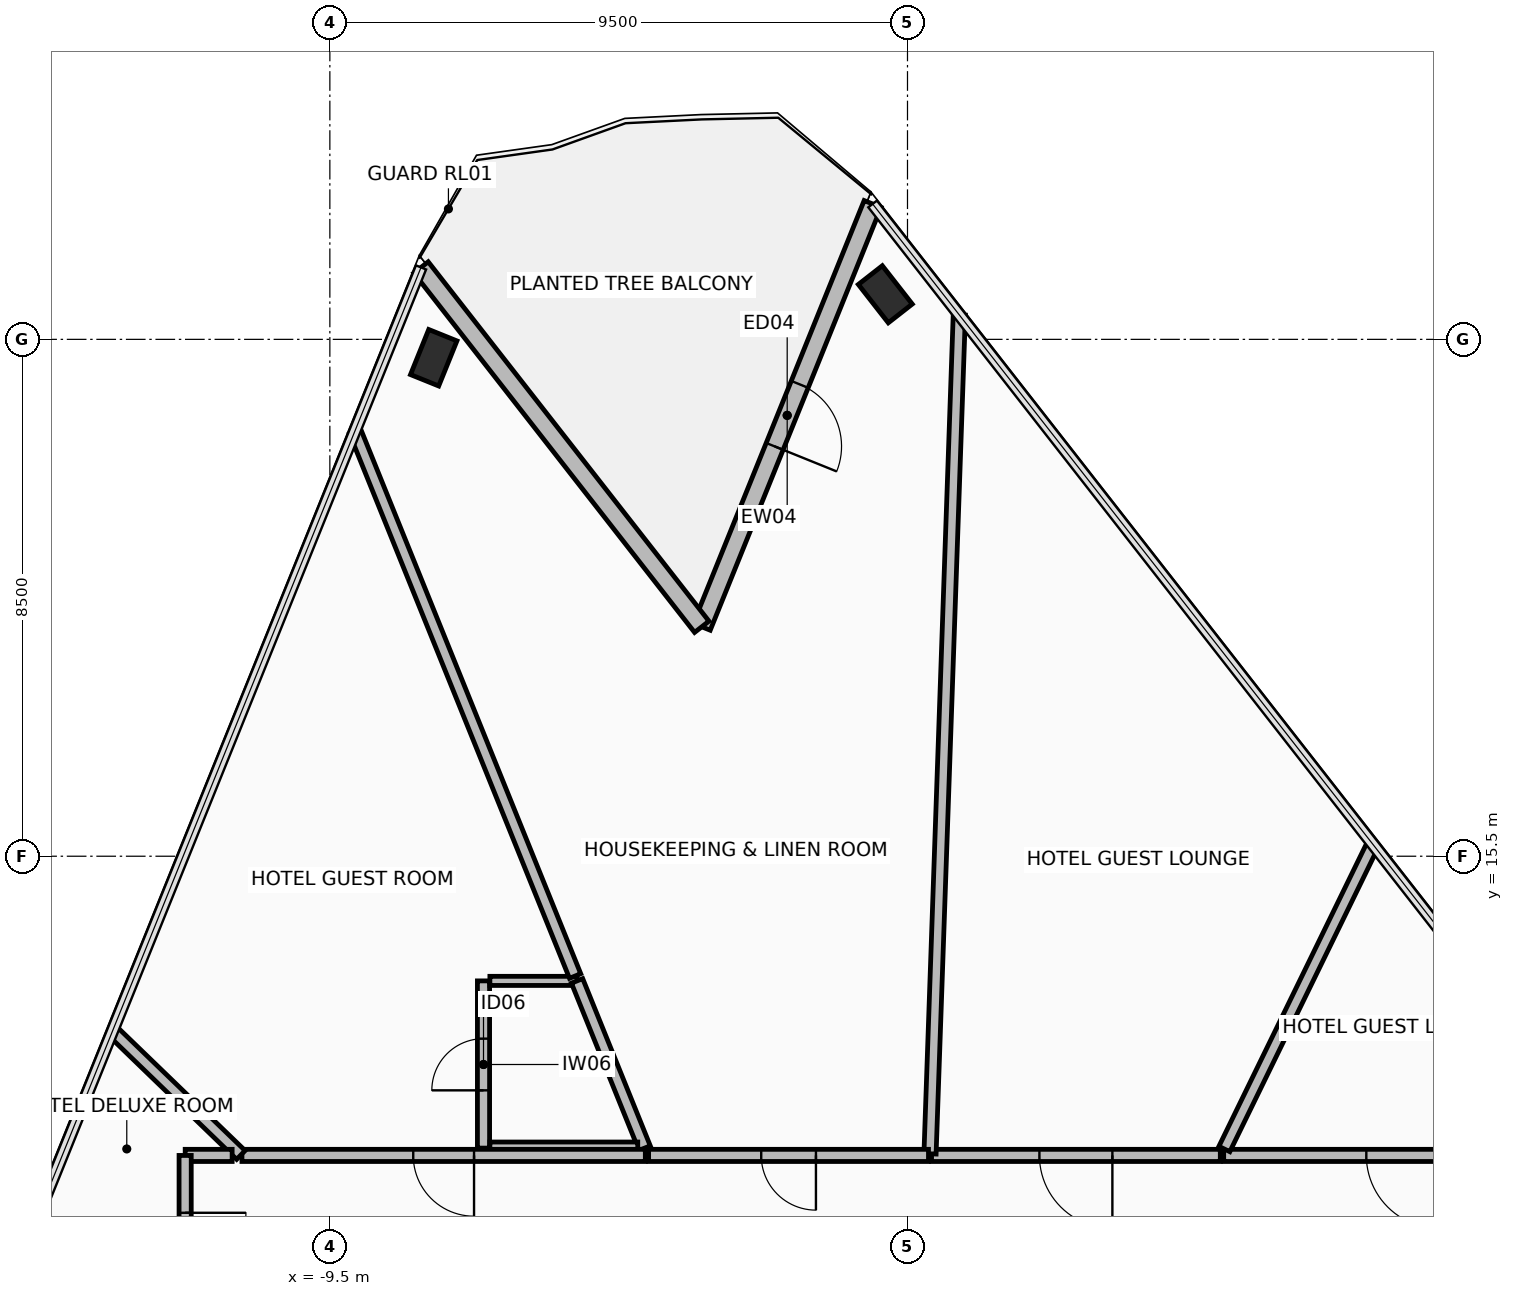
"""IFC4 building model, lengths in metres.
Left out: names, types, materials, properties, quantities, classifications, styles, units other than length and angle.
Written with IfcOpenShell. Run it as: python <this file> out.ifc"""

import sys

from ifc_helpers import new_model, si_unit, direction, frame, frame_2d, origin, origin_2d, place, context, subcontext, project, spatial, rectangle, hollow_rectangle, extrude, element, fill, save


model = new_model("IFC4")
c1 = context("Model", 3, precision=1e-05, world=origin(), true_north=direction((0.0, 1.0)))
c2 = subcontext(c1, "Body", "Model", "MODEL_VIEW")
j1 = project(units=[si_unit("LENGTHUNIT", "METRE"), si_unit("PLANEANGLEUNIT", "RADIAN")], contexts=[c1])
p1 = place(None, origin())
s1 = spatial("IfcSite", under=j1, at=p1, CompositionType="ELEMENT")
p2 = place(p1, origin())
s2 = spatial("IfcBuilding", under=s1, at=p2, CompositionType="ELEMENT")
p3 = place(p2, frame((0.0, 0.0, 57.0)))
s3 = spatial("IfcBuildingStorey", under=s2, at=p3, CompositionType="ELEMENT", Elevation=57.0)
p4 = place(p3, frame((-7.792, 23.698, -0.19), z_axis=(0.0, 0.0, 1.0), x_axis=(0.374608211656, 0.927183200754, 0.0)))
e1 = element("IfcColumn", 1, at=p4, inside=s3, PredefinedType="COLUMN", context=c2, shape_type="SweptSolid", body=[
    extrude(hollow_rectangle(XDim=0.5, YDim=0.8, WallThickness=0.04, at=origin_2d()), origin(), (0.0, 0.0, 1.0), 3.64),
])
p5 = place(p3, frame((-0.365, 24.741, 0.0), z_axis=(0.0, 0.0, 1.0), x_axis=(-0.615661475326, 0.788010753607, 0.0)))
e2 = element("IfcColumn", 2, at=p5, inside=s3, PredefinedType="COLUMN", context=c2, shape_type="SweptSolid", body=[
    extrude(hollow_rectangle(XDim=0.5, YDim=0.8, WallThickness=0.04, at=origin_2d()), origin(), (0.0, 0.0, 1.0), 3.45),
])
p6 = place(p3, frame((-0.574, 26.227, 0.0), z_axis=(0.0, 0.0, 1.0), x_axis=(-0.374609979755, -0.92718248639, 0.0)))
e3 = element("IfcWall", 3, at=p6, inside=s3, PredefinedType="STANDARD", context=c2, shape_type="SweptSolid", body=[
    extrude(rectangle(XDim=7.5, YDim=0.3, at=frame_2d((3.75, 0.0))), origin(), (0.0, 0.0, 1.0), 2.47),
])
p7 = place(p6, frame((3.2, 0.0, 0.0)))
e4 = element("IfcOpeningElement", 4, at=p7, cuts=e3, PredefinedType="OPENING", context=c2, shape_type="SweptSolid", body=[
    extrude(rectangle(XDim=1.1, YDim=2.2, at=frame_2d((0.55, 1.1))), frame((0.0, 0.16, 0.0), z_axis=(0.0, -1.0, 0.0), x_axis=(1.0, 0.0, 0.0)), (0.0, 0.0, 1.0), 0.32),
])
p8 = place(p3, frame((-3.383, 19.273, 0.0), z_axis=(0.0, 0.0, 1.0), x_axis=(-0.615654149001, 0.788016477504, 0.0)))
e5 = element("IfcWall", 5, at=p8, inside=s3, PredefinedType="STANDARD", context=c2, shape_type="SweptSolid", body=[
    extrude(rectangle(XDim=7.5, YDim=0.3, at=frame_2d((3.75, 0.0))), origin(), (0.0, 0.0, 1.0), 2.47),
])
p9 = place(p3, frame((-6.973, 10.7, 0.0), z_axis=(0.0, 0.0, 1.0), x_axis=(0.0, 1.0, 0.0)))
e6 = element("IfcWall", 6, at=p9, inside=s3, PredefinedType="PARTITIONING", context=c2, shape_type="SweptSolid", body=[
    extrude(rectangle(XDim=2.75, YDim=0.2, at=frame_2d((1.375, 0.0))), origin(), (0.0, 0.0, 1.0), 2.62),
])
p10 = place(p9, frame((0.95, 0.0, 0.0)))
e7 = element("IfcOpeningElement", 7, at=p10, cuts=e6, PredefinedType="OPENING", context=c2, shape_type="SweptSolid", body=[
    extrude(rectangle(XDim=0.85, YDim=2.1, at=frame_2d((0.425, 1.05))), frame((0.0, 0.11, 0.0), z_axis=(0.0, -1.0, 0.0), x_axis=(1.0, 0.0, 0.0)), (0.0, 0.0, 1.0), 0.22),
])
p11 = place(p3, frame((-6.868, 13.45, 0.0), z_axis=(0.0, 0.0, 1.0), x_axis=(1.0, 0.0, 0.0)))
e8 = element("IfcWall", 8, at=p11, inside=s3, PredefinedType="PARTITIONING", context=c2, shape_type="SweptSolid", body=[
    extrude(rectangle(XDim=1.434, YDim=0.15, at=frame_2d((0.717, 0.0))), origin(), (0.0, 0.0, 1.0), 3.275),
])
p12 = place(p3, frame((-5.434, 13.45, 0.0), z_axis=(0.0, 0.0, 1.0), x_axis=(0.374610031927, -0.927182465311, 0.0)))
e9 = element("IfcWall", 9, at=p12, inside=s3, PredefinedType="PARTITIONING", context=c2, shape_type="SweptSolid", body=[
    extrude(rectangle(XDim=2.966, YDim=0.2, at=frame_2d((1.483, 0.0))), origin(), (0.0, 0.0, 1.0), 3.275),
])
p13 = place(p3, frame((-4.436, 10.7, 0.0), z_axis=(0.0, 0.0, 1.0), x_axis=(-1.0, 0.0, 0.0)))
e10 = element("IfcWall", 10, at=p13, inside=s3, PredefinedType="PARTITIONING", context=c2, shape_type="SweptSolid", body=[
    extrude(rectangle(XDim=2.432, YDim=0.2, at=frame_2d((1.216, 0.0))), origin(), (0.0, 0.0, 1.0), 3.275),
])
p14 = place(p3, frame((11.651, 10.58, 0.0), z_axis=(0.0, 0.0, 1.0), x_axis=(-1.0, 0.0, 0.0)))
e11 = element("IfcWall", 11, at=p14, inside=s3, PredefinedType="PARTITIONING", context=c2, shape_type="SweptSolid", body=[
    extrude(rectangle(XDim=6.451, YDim=0.2, at=frame_2d((3.225, 0.0))), origin(), (0.0, 0.0, 1.0), 2.47),
])
p15 = place(p14, frame((2.905, 0.0, 0.0)))
e12 = element("IfcOpeningElement", 12, at=p15, cuts=e11, PredefinedType="OPENING", context=c2, shape_type="SweptSolid", body=[
    extrude(rectangle(XDim=1.2, YDim=2.15, at=frame_2d((0.6, 1.075))), frame((0.0, 0.11, 0.0), z_axis=(0.0, -1.0, 0.0), x_axis=(1.0, 0.0, 0.0)), (0.0, 0.0, 1.0), 0.22),
])
p16 = place(p3, frame((5.211, 10.685, 0.0), z_axis=(0.0, 0.0, 1.0), x_axis=(0.438361496965, 0.898798752769, 0.0)))
e13 = element("IfcWall", 13, at=p16, inside=s3, PredefinedType="PARTITIONING", context=c2, shape_type="SweptSolid", body=[
    extrude(rectangle(XDim=5.574, YDim=0.2, at=frame_2d((2.787, 0.0))), origin(), (0.0, 0.0, 1.0), 2.47),
])
p17 = place(p3, frame((5.145, 10.58, 0.0), z_axis=(0.0, 0.0, 1.0), x_axis=(-1.0, 0.0, 0.0)))
e14 = element("IfcWall", 14, at=p17, inside=s3, PredefinedType="PARTITIONING", context=c2, shape_type="SweptSolid", body=[
    extrude(rectangle(XDim=4.749, YDim=0.2, at=frame_2d((2.375, 0.0))), origin(), (0.0, 0.0, 1.0), 2.67),
])
p18 = place(p17, frame((1.775, 0.0, 0.0)))
e15 = element("IfcOpeningElement", 15, at=p18, cuts=e14, PredefinedType="OPENING", context=c2, shape_type="SweptSolid", body=[
    extrude(rectangle(XDim=1.2, YDim=2.15, at=frame_2d((0.6, 1.075))), frame((0.0, 0.11, 0.0), z_axis=(0.0, -1.0, 0.0), x_axis=(1.0, 0.0, 0.0)), (0.0, 0.0, 1.0), 0.22),
])
p19 = place(p3, frame((0.37, 10.606, 0.0), z_axis=(0.0, 0.0, 1.0), x_axis=(0.03489353046, 0.999391035347, 0.0)))
e16 = element("IfcWall", 16, at=p19, inside=s3, PredefinedType="PARTITIONING", context=c2, shape_type="SweptSolid", body=[
    extrude(rectangle(XDim=13.804, YDim=0.2, at=frame_2d((6.902, 0.0))), origin(), (0.0, 0.0, 1.0), 2.47),
])
p20 = place(p3, frame((0.345, 10.58, 0.0), z_axis=(0.0, 0.0, 1.0), x_axis=(-1.0, 0.0, 0.0)))
e17 = element("IfcWall", 17, at=p20, inside=s3, PredefinedType="PARTITIONING", context=c2, shape_type="SweptSolid", body=[
    extrude(rectangle(XDim=4.603, YDim=0.2, at=frame_2d((2.302, 0.0))), origin(), (0.0, 0.0, 1.0), 3.275),
])
p21 = place(p20, frame((1.851, 0.0, 0.0)))
e18 = element("IfcOpeningElement", 18, at=p21, cuts=e17, PredefinedType="OPENING", context=c2, shape_type="SweptSolid", body=[
    extrude(rectangle(XDim=0.9, YDim=2.1, at=frame_2d((0.45, 1.05))), frame((0.0, 0.11, 0.0), z_axis=(0.0, -1.0, 0.0), x_axis=(1.0, 0.0, 0.0)), (0.0, 0.0, 1.0), 0.22),
])
p22 = place(p3, frame((-5.467, 13.53, 0.0), z_axis=(0.0, 0.0, 1.0), x_axis=(-0.374609771438, 0.927182570556, 0.0)))
e19 = element("IfcWall", 19, at=p22, inside=s3, PredefinedType="PARTITIONING", context=c2, shape_type="SweptSolid", body=[
    extrude(rectangle(XDim=9.656, YDim=0.2, at=frame_2d((4.828, 0.0))), origin(), (0.0, 0.0, 1.0), 2.47),
])
p23 = place(p3, frame((-4.312, 10.58, 0.0), z_axis=(0.0, 0.0, 1.0), x_axis=(-1.0, 0.0, 0.0)))
e20 = element("IfcWall", 20, at=p23, inside=s3, PredefinedType="PARTITIONING", context=c2, shape_type="SweptSolid", body=[
    extrude(rectangle(XDim=6.634, YDim=0.2, at=frame_2d((3.317, 0.0))), origin(), (0.0, 0.0, 1.0), 2.62),
])
p24 = place(p23, frame((2.817, 0.0, 0.0)))
e21 = element("IfcOpeningElement", 21, at=p24, cuts=e20, PredefinedType="OPENING", context=c2, shape_type="SweptSolid", body=[
    extrude(rectangle(XDim=1.0, YDim=2.15, at=frame_2d((0.5, 1.075))), frame((0.0, 0.11, 0.0), z_axis=(0.0, -1.0, 0.0), x_axis=(1.0, 0.0, 0.0)), (0.0, 0.0, 1.0), 0.22),
])
p25 = place(p3, frame((-10.963, 10.587, 0.0), z_axis=(0.0, 0.0, 1.0), x_axis=(-0.719299093908, 0.69470052073, 0.0)))
e22 = element("IfcWall", 22, at=p25, inside=s3, PredefinedType="PARTITIONING", context=c2, shape_type="SweptSolid", body=[
    extrude(rectangle(XDim=2.918, YDim=0.2, at=frame_2d((1.459, 0.0))), origin(), (0.0, 0.0, 1.0), 2.47),
])
p26 = place(p3, frame((-11.107, 10.58, 0.0), z_axis=(0.0, 0.0, 1.0), x_axis=(-1.0, 0.0, 0.0)))
e23 = element("IfcWall", 23, at=p26, inside=s3, PredefinedType="PARTITIONING", context=c2, shape_type="SweptSolid", body=[
    extrude(rectangle(XDim=0.772, YDim=0.2, at=frame_2d((0.386, 0.0))), origin(), (0.0, 0.0, 1.0), 3.275),
])
p27 = place(p3, frame((-11.88, 10.579, 0.0), z_axis=(0.0, 0.0, 1.0), x_axis=(0.0, -1.0, 0.0)))
e24 = element("IfcWall", 24, at=p27, inside=s3, PredefinedType="PARTITIONING", context=c2, shape_type="SweptSolid", body=[
    extrude(rectangle(XDim=3.445, YDim=0.2, at=frame_2d((1.723, 0.0))), origin(), (0.0, 0.0, 1.0), 2.67),
])
p28 = place(p27, frame((0.943, 0.0, 0.0)))
e25 = element("IfcOpeningElement", 25, at=p28, cuts=e24, PredefinedType="OPENING", context=c2, shape_type="SweptSolid", body=[
    extrude(rectangle(XDim=1.0, YDim=2.15, at=frame_2d((0.5, 1.075))), frame((0.0, 0.11, 0.0), z_axis=(0.0, -1.0, 0.0), x_axis=(1.0, 0.0, 0.0)), (0.0, 0.0, 1.0), 0.22),
])
p29 = place(p7, frame((1.1, 0.0, 0.0), z_axis=(0.0, 0.0, 1.0), x_axis=(-1.0, 0.0, 0.0)))
e26 = element("IfcDoor", 26, at=p29, inside=s3, OperationType="SINGLE_SWING_LEFT", PredefinedType="DOOR", context=c2, shape_type="SweptSolid", body=[
    extrude(rectangle(XDim=1.1, YDim=2.2, at=frame_2d((0.55, 1.1))), frame((0.0, 0.025, 0.0), z_axis=(0.0, -1.0, 0.0), x_axis=(1.0, 0.0, 0.0)), (0.0, 0.0, 1.0), 0.05),
])
fill(e4, e26)
p30 = place(p10, origin())
e27 = element("IfcDoor", 27, at=p30, inside=s3, OperationType="SINGLE_SWING_RIGHT", PredefinedType="DOOR", context=c2, shape_type="SweptSolid", body=[
    extrude(rectangle(XDim=0.85, YDim=2.1, at=frame_2d((0.425, 1.05))), frame((0.0, 0.025, 0.0), z_axis=(0.0, -1.0, 0.0), x_axis=(1.0, 0.0, 0.0)), (0.0, 0.0, 1.0), 0.05),
])
fill(e7, e27)
p31 = place(p15, origin())
e28 = element("IfcDoor", 28, at=p31, inside=s3, OperationType="SINGLE_SWING_LEFT", PredefinedType="DOOR", context=c2, shape_type="SweptSolid", body=[
    extrude(rectangle(XDim=1.2, YDim=2.15, at=frame_2d((0.6, 1.075))), frame((0.0, 0.025, 0.0), z_axis=(0.0, -1.0, 0.0), x_axis=(1.0, 0.0, 0.0)), (0.0, 0.0, 1.0), 0.05),
])
fill(e12, e28)
p32 = place(p18, origin())
e29 = element("IfcDoor", 29, at=p32, inside=s3, OperationType="SINGLE_SWING_LEFT", PredefinedType="DOOR", context=c2, shape_type="SweptSolid", body=[
    extrude(rectangle(XDim=1.2, YDim=2.15, at=frame_2d((0.6, 1.075))), frame((0.0, 0.025, 0.0), z_axis=(0.0, -1.0, 0.0), x_axis=(1.0, 0.0, 0.0)), (0.0, 0.0, 1.0), 0.05),
])
fill(e15, e29)
p33 = place(p21, origin())
e30 = element("IfcDoor", 30, at=p33, inside=s3, OperationType="SINGLE_SWING_LEFT", PredefinedType="DOOR", context=c2, shape_type="SweptSolid", body=[
    extrude(rectangle(XDim=0.9, YDim=2.1, at=frame_2d((0.45, 1.05))), frame((0.0, 0.025, 0.0), z_axis=(0.0, -1.0, 0.0), x_axis=(1.0, 0.0, 0.0)), (0.0, 0.0, 1.0), 0.05),
])
fill(e18, e30)
p34 = place(p24, origin())
e31 = element("IfcDoor", 31, at=p34, inside=s3, OperationType="SINGLE_SWING_LEFT", PredefinedType="DOOR", context=c2, shape_type="SweptSolid", body=[
    extrude(rectangle(XDim=1.0, YDim=2.15, at=frame_2d((0.5, 1.075))), frame((0.0, 0.025, 0.0), z_axis=(0.0, -1.0, 0.0), x_axis=(1.0, 0.0, 0.0)), (0.0, 0.0, 1.0), 0.05),
])
fill(e21, e31)
p35 = place(p28, origin())
e32 = element("IfcDoor", 32, at=p35, inside=s3, OperationType="SINGLE_SWING_LEFT", PredefinedType="DOOR", context=c2, shape_type="SweptSolid", body=[
    extrude(rectangle(XDim=1.0, YDim=2.15, at=frame_2d((0.5, 1.075))), frame((0.0, 0.025, 0.0), z_axis=(0.0, -1.0, 0.0), x_axis=(1.0, 0.0, 0.0)), (0.0, 0.0, 1.0), 0.05),
])
fill(e25, e32)
save(model, sys.argv[1])
